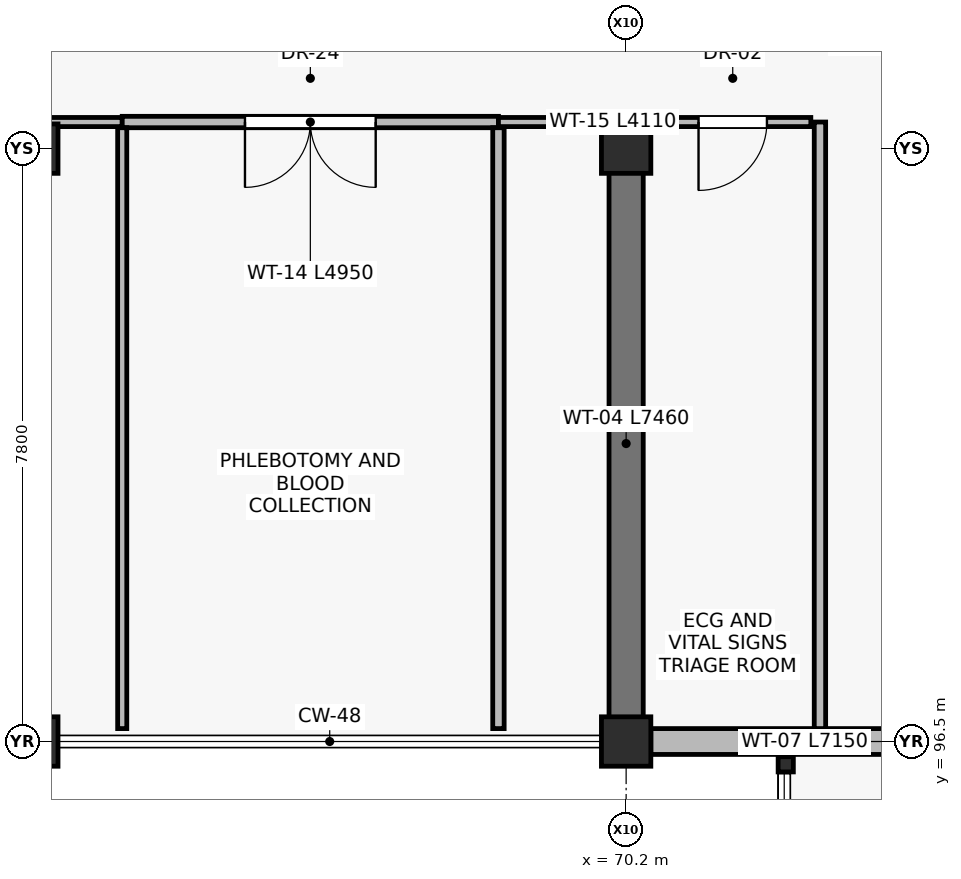
"""IFC4 building model, lengths in metres.
Left out: names, types, materials, properties, quantities, classifications, styles, units other than length and angle.
Written with IfcOpenShell. Run it as: python <this file> out.ifc"""

import sys

from ifc_helpers import new_model, si_unit, direction, frame, frame_2d, origin, origin_2d, place, context, subcontext, project, spatial, rectangle, hollow_rectangle, extrude, element, fill, save


model = new_model("IFC4")
c1 = context("Model", 3, precision=1e-05, world=origin(), true_north=direction((0.0, 1.0)))
c2 = subcontext(c1, "Body", "Model", "MODEL_VIEW")
j1 = project(units=[si_unit("LENGTHUNIT", "METRE"), si_unit("PLANEANGLEUNIT", "RADIAN")], contexts=[c1])
p1 = place(None, origin())
s1 = spatial("IfcSite", under=j1, at=p1, CompositionType="ELEMENT")
p2 = place(p1, origin())
s2 = spatial("IfcBuilding", under=s1, at=p2, CompositionType="ELEMENT")
p3 = place(p2, origin())
s3 = spatial("IfcBuildingStorey", under=s2, at=p3, CompositionType="ELEMENT", Elevation=0.0)
for number, where, z_axis, x_axis in (
    (1, (62.4, 96.5, 0.0), (0.0, 0.0, 1.0), (1.0, 0.0, 0.0)),
    (2, (62.4, 104.3, 0.0), (0.0, 0.0, 1.0), (1.0, 0.0, 0.0)),
    (3, (70.2, 96.5, 0.0), (0.0, 0.0, 1.0), (1.0, 0.0, 0.0)),
    (4, (70.2, 104.3, 0.0), (0.0, 0.0, 1.0), (1.0, 0.0, 0.0)),
):
    element("IfcColumn", number, at=place(p3, frame(where, z_axis=z_axis, x_axis=x_axis)), inside=s3, PredefinedType="COLUMN", context=c2, shape_type="SweptSolid", body=[
        extrude(rectangle(XDim=0.65, YDim=0.65, at=origin_2d()), origin(), (0.0, 0.0, 1.0), 4.8),
    ])
p4 = place(p3, frame((72.3, 96.2, 0.0), z_axis=(0.0, 0.0, 1.0), x_axis=(1.0, 0.0, 0.0)))
e5 = element("IfcColumn", 5, at=p4, inside=s3, PredefinedType="COLUMN", context=c2, shape_type="SweptSolid", body=[
    extrude(hollow_rectangle(XDim=0.2, YDim=0.2, WallThickness=0.01, at=origin_2d()), origin(), (0.0, 0.0, 1.0), 4.8),
])
p5 = place(p3, frame((77.675, 96.5, 0.0), z_axis=(0.0, 0.0, 1.0), x_axis=(-1.0, 0.0, 0.0)))
e6 = element("IfcWall", 6, at=p5, inside=s3, PredefinedType="STANDARD", context=c2, shape_type="SweptSolid", body=[
    extrude(rectangle(XDim=7.15, YDim=0.34, at=frame_2d((3.575, 0.0))), origin(), (0.0, 0.0, 1.0), 3.385),
])
p6 = place(p5, frame((2.475, 0.0, 0.0)))
e7 = element("IfcOpeningElement", 7, at=p6, cuts=e6, PredefinedType="OPENING", context=c2, shape_type="SweptSolid", body=[
    extrude(rectangle(XDim=1.6, YDim=2.2, at=frame_2d((0.8, 1.1))), frame((0.0, 0.18, 0.0), z_axis=(0.0, -1.0, 0.0), x_axis=(1.0, 0.0, 0.0)), (0.0, 0.0, 1.0), 0.36),
])
p7 = place(p3, frame((70.2, 96.69, 0.0), z_axis=(0.0, 0.0, 1.0), x_axis=(0.0, 1.0, 0.0)))
e8 = element("IfcWall", 8, at=p7, inside=s3, PredefinedType="SHEAR", context=c2, shape_type="SweptSolid", body=[
    extrude(rectangle(XDim=7.46, YDim=0.45, at=frame_2d((3.73, 0.0))), origin(), (0.0, 0.0, 1.0), 4.54),
])
p8 = place(p3, frame((72.75, 96.67, 0.0), z_axis=(0.0, 0.0, 1.0), x_axis=(0.0, 1.0, 0.0)))
e9 = element("IfcWall", 9, at=p8, inside=s3, PredefinedType="PARTITIONING", context=c2, shape_type="SweptSolid", body=[
    extrude(rectangle(XDim=7.98, YDim=0.15, at=frame_2d((3.99, 0.0))), origin(), (0.0, 0.0, 1.0), 4.21),
])
p9 = place(p3, frame((63.57, 104.65, 0.0), z_axis=(0.0, 0.0, 1.0), x_axis=(-1.0, 0.0, 0.0)))
e10 = element("IfcWall", 10, at=p9, inside=s3, PredefinedType="PARTITIONING", context=c2, shape_type="SweptSolid", body=[
    extrude(rectangle(XDim=6.4, YDim=0.12, at=frame_2d((3.2, 0.0))), origin(), (0.0, 0.0, 1.0), 4.04),
])
p10 = place(p9, frame((2.46, 0.0, 0.0)))
e11 = element("IfcOpeningElement", 11, at=p10, cuts=e10, PredefinedType="OPENING", context=c2, shape_type="SweptSolid", body=[
    extrude(rectangle(XDim=1.48, YDim=2.25, at=frame_2d((0.74, 1.125))), frame((0.0, 0.07, 0.0), z_axis=(0.0, -1.0, 0.0), x_axis=(1.0, 0.0, 0.0)), (0.0, 0.0, 1.0), 0.14),
])
p11 = place(p3, frame((68.52, 104.65, 0.0), z_axis=(0.0, 0.0, 1.0), x_axis=(-1.0, 0.0, 0.0)))
e12 = element("IfcWall", 12, at=p11, inside=s3, PredefinedType="PARTITIONING", context=c2, shape_type="SweptSolid", body=[
    extrude(rectangle(XDim=4.95, YDim=0.15, at=frame_2d((2.475, 0.0))), origin(), (0.0, 0.0, 1.0), 4.04),
])
p12 = place(p11, frame((1.615, 0.0, 0.0)))
e13 = element("IfcOpeningElement", 13, at=p12, cuts=e12, PredefinedType="OPENING", context=c2, shape_type="SweptSolid", body=[
    extrude(rectangle(XDim=1.72, YDim=2.3, at=frame_2d((0.86, 1.15))), frame((0.0, 0.085, 0.0), z_axis=(0.0, -1.0, 0.0), x_axis=(1.0, 0.0, 0.0)), (0.0, 0.0, 1.0), 0.17),
])
p13 = place(p3, frame((72.63, 104.65, 0.0), z_axis=(0.0, 0.0, 1.0), x_axis=(-1.0, 0.0, 0.0)))
e14 = element("IfcWall", 14, at=p13, inside=s3, PredefinedType="PARTITIONING", context=c2, shape_type="SweptSolid", body=[
    extrude(rectangle(XDim=4.11, YDim=0.12, at=frame_2d((2.055, 0.0))), origin(), (0.0, 0.0, 1.0), 4.04),
])
p14 = place(p13, frame((0.577, 0.0, 0.0)))
e15 = element("IfcOpeningElement", 15, at=p14, cuts=e14, PredefinedType="OPENING", context=c2, shape_type="SweptSolid", body=[
    extrude(rectangle(XDim=0.9, YDim=2.1, at=frame_2d((0.45, 1.05))), frame((0.0, 0.07, 0.0), z_axis=(0.0, -1.0, 0.0), x_axis=(1.0, 0.0, 0.0)), (0.0, 0.0, 1.0), 0.14),
])
p15 = place(p3, frame((63.57, 96.67, 0.0), z_axis=(0.0, 0.0, 1.0), x_axis=(0.0, 1.0, 0.0)))
e16 = element("IfcWall", 16, at=p15, inside=s3, PredefinedType="PARTITIONING", context=c2, shape_type="SweptSolid", body=[
    extrude(rectangle(XDim=7.905, YDim=0.12, at=frame_2d((3.953, 0.0))), origin(), (0.0, 0.0, 1.0), 4.54),
])
p16 = place(p3, frame((68.52, 96.67, 0.0), z_axis=(0.0, 0.0, 1.0), x_axis=(0.0, 1.0, 0.0)))
e17 = element("IfcWall", 17, at=p16, inside=s3, PredefinedType="PARTITIONING", context=c2, shape_type="SweptSolid", body=[
    extrude(rectangle(XDim=7.905, YDim=0.15, at=frame_2d((3.953, 0.0))), origin(), (0.0, 0.0, 1.0), 4.54),
])
p17 = place(p12, origin())
e18 = element("IfcDoor", 18, at=p17, inside=s3, OperationType="DOUBLE_DOOR_SINGLE_SWING", PredefinedType="DOOR", context=c2, shape_type="SweptSolid", body=[
    extrude(rectangle(XDim=1.72, YDim=2.3, at=frame_2d((0.86, 1.15))), frame((0.0, 0.025, 0.0), z_axis=(0.0, -1.0, 0.0), x_axis=(1.0, 0.0, 0.0)), (0.0, 0.0, 1.0), 0.05),
])
fill(e13, e18)
p18 = place(p14, origin())
e19 = element("IfcDoor", 19, at=p18, inside=s3, OperationType="SINGLE_SWING_RIGHT", PredefinedType="DOOR", context=c2, shape_type="SweptSolid", body=[
    extrude(rectangle(XDim=0.9, YDim=2.1, at=frame_2d((0.45, 1.05))), frame((0.0, 0.025, 0.0), z_axis=(0.0, -1.0, 0.0), x_axis=(1.0, 0.0, 0.0)), (0.0, 0.0, 1.0), 0.05),
])
fill(e15, e19)
save(model, sys.argv[1])
